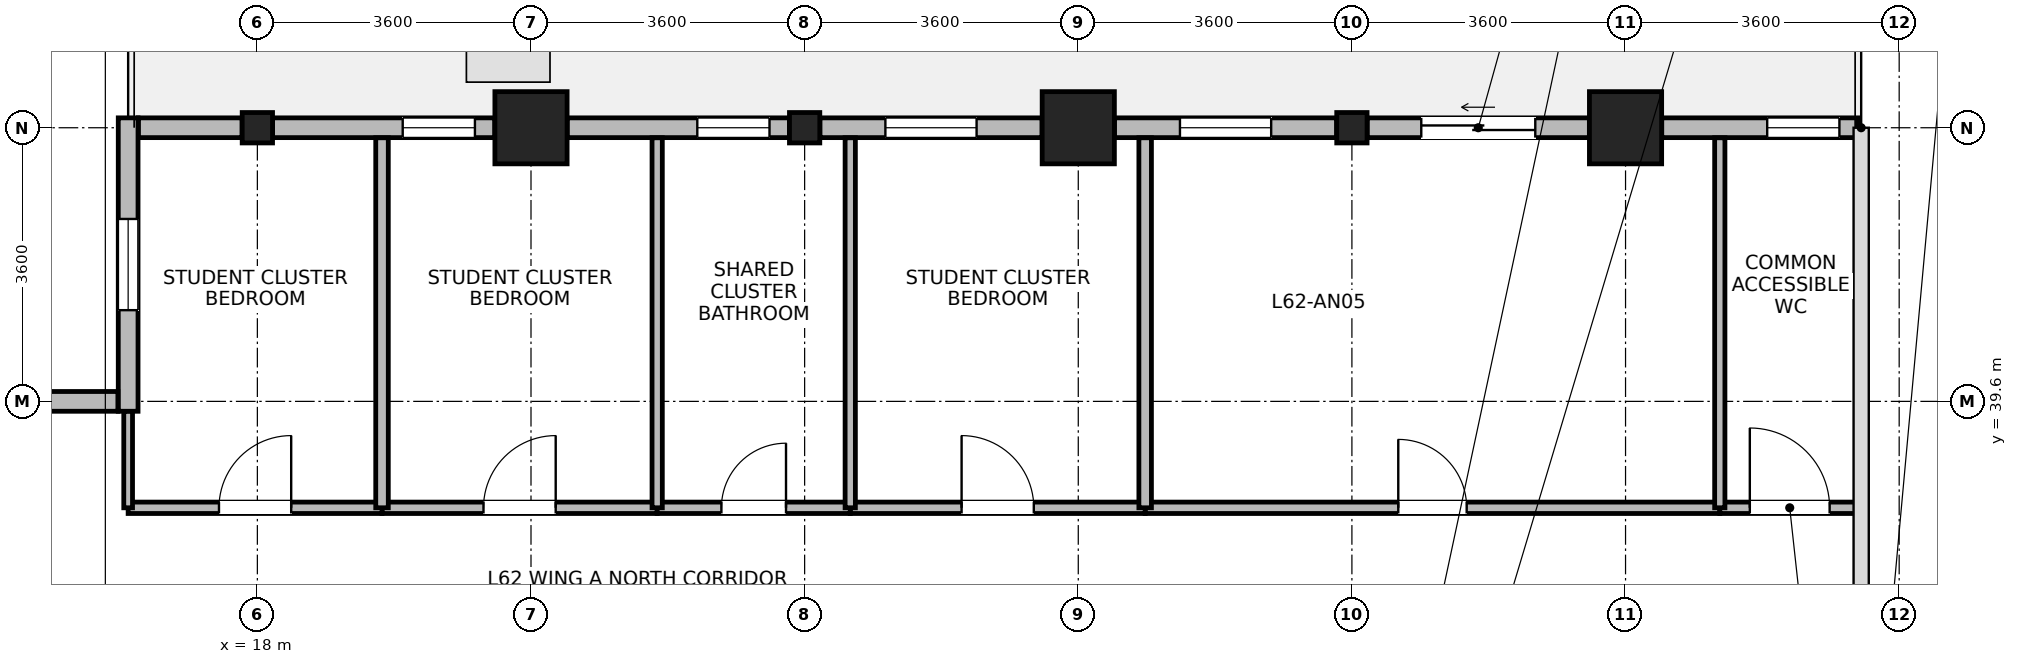
"""IFC4 building model, lengths in metres.
Left out: names, types, materials, properties, quantities, classifications, styles, units other than length and angle.
Written with IfcOpenShell. Run it as: python <this file> out.ifc"""

import sys

from ifc_helpers import new_model, si_unit, direction, frame, frame_2d, origin, origin_2d, place, context, subcontext, project, spatial, rectangle, i_section, extrude, source, transform, mapped, element, fill, save


model = new_model("IFC4")
c1 = context("Model", 3, precision=1e-05, world=origin(), true_north=direction((0.0, 1.0)))
c2 = subcontext(c1, "Body", "Model", "MODEL_VIEW")
j1 = project(units=[si_unit("LENGTHUNIT", "METRE"), si_unit("PLANEANGLEUNIT", "RADIAN")], contexts=[c1])
p1 = place(None, origin())
s1 = spatial("IfcSite", under=j1, at=p1, CompositionType="ELEMENT")
p2 = place(p1, origin())
s2 = spatial("IfcBuilding", under=s1, at=p2, CompositionType="ELEMENT")
p3 = place(p2, frame((0.0, 0.0, 242.5)))
s3 = spatial("IfcBuildingStorey", under=s2, at=p3, CompositionType="ELEMENT", Elevation=242.5)
m1 = source(origin(), c2, "Body", "SweptSolid", [
    extrude(rectangle(XDim=0.95, YDim=0.95, at=origin_2d()), origin(), (0.0, 0.0, 1.0), 3.7),
])
for number, where, z_axis, x_axis in (
    (1, (21.6, 43.2, 0.0), (0.0, 0.0, 1.0), (1.0, 0.0, 0.0)),
    (2, (28.8, 43.2, 0.0), (0.0, 0.0, 1.0), (1.0, 0.0, 0.0)),
    (3, (36.0, 43.2, 0.0), (0.0, 0.0, 1.0), (1.0, 0.0, 0.0)),
):
    element("IfcColumn", number, at=place(p3, frame(where, z_axis=z_axis, x_axis=x_axis)), inside=s3, PredefinedType="COLUMN", context=c2, shape_type="MappedRepresentation", body=[
        mapped(m1, transform((0.0, 0.0, 0.0), x_axis=(1.0, 0.0, 0.0), y_axis=(0.0, 1.0, 0.0), z_axis=(0.0, 0.0, 1.0), scale=1.0)),
    ])
m2 = source(origin(), c2, "Body", "SweptSolid", [
    extrude(i_section(OverallWidth=0.399, OverallDepth=0.4, WebThickness=0.017, FlangeThickness=0.023, FilletRadius=0.015, at=origin_2d()), origin(), (0.0, 0.0, 1.0), 3.7),
])
for number, where, z_axis, x_axis in (
    (4, (18.0, 43.2, 0.0), (0.0, 0.0, 1.0), (1.0, 0.0, 0.0)),
    (5, (25.2, 43.2, 0.0), (0.0, 0.0, 1.0), (1.0, 0.0, 0.0)),
    (6, (32.4, 43.2, 0.0), (0.0, 0.0, 1.0), (1.0, 0.0, 0.0)),
):
    element("IfcColumn", number, at=place(p3, frame(where, z_axis=z_axis, x_axis=x_axis)), inside=s3, PredefinedType="COLUMN", context=c2, shape_type="MappedRepresentation", body=[
        mapped(m2, transform((0.0, 0.0, 0.0), x_axis=(1.0, 0.0, 0.0), y_axis=(0.0, 1.0, 0.0), z_axis=(0.0, 0.0, 1.0), scale=1.0)),
    ])
p4 = place(p3, frame((36.476, 43.2, 0.0), z_axis=(0.0, 0.0, 1.0), x_axis=(1.0, 0.0, 0.0)))
e7 = element("IfcWall", 7, at=p4, inside=s3, PredefinedType="STANDARD", context=c2, shape_type="SweptSolid", body=[
    extrude(rectangle(XDim=2.587, YDim=0.26, at=frame_2d((1.293, 0.0))), origin(), (0.0, 0.0, 1.0), 3.42),
])
p5 = place(p4, frame((1.388, 0.0, 0.85)))
e8 = element("IfcOpeningElement", 8, at=p5, cuts=e7, PredefinedType="OPENING", context=c2, shape_type="SweptSolid", body=[
    extrude(rectangle(XDim=0.95, YDim=1.75, at=frame_2d((0.475, 0.875))), frame((0.0, 0.14, 0.0), z_axis=(0.0, -1.0, 0.0), x_axis=(1.0, 0.0, 0.0)), (0.0, 0.0, 1.0), 0.28),
])
p6 = place(p3, frame((32.601, 43.2, 0.0), z_axis=(0.0, 0.0, 1.0), x_axis=(1.0, 0.0, 0.0)))
e9 = element("IfcWall", 9, at=p6, inside=s3, PredefinedType="STANDARD", context=c2, shape_type="SweptSolid", body=[
    extrude(rectangle(XDim=2.923, YDim=0.26, at=frame_2d((1.462, 0.0))), origin(), (0.0, 0.0, 1.0), 3.02),
])
p7 = place(p6, frame((0.712, 0.0, 0.0)))
e10 = element("IfcOpeningElement", 10, at=p7, cuts=e9, PredefinedType="OPENING", context=c2, shape_type="SweptSolid", body=[
    extrude(rectangle(XDim=1.5, YDim=2.15, at=frame_2d((0.75, 1.075))), frame((0.0, 0.14, 0.0), z_axis=(0.0, -1.0, 0.0), x_axis=(1.0, 0.0, 0.0)), (0.0, 0.0, 1.0), 0.28),
])
p8 = place(p3, frame((29.276, 43.2, 0.0), z_axis=(0.0, 0.0, 1.0), x_axis=(1.0, 0.0, 0.0)))
e11 = element("IfcWall", 11, at=p8, inside=s3, PredefinedType="STANDARD", context=c2, shape_type="SweptSolid", body=[
    extrude(rectangle(XDim=2.924, YDim=0.26, at=frame_2d((1.462, 0.0))), origin(), (0.0, 0.0, 1.0), 3.02),
])
p9 = place(p8, frame((0.862, 0.0, 0.85)))
e12 = element("IfcOpeningElement", 12, at=p9, cuts=e11, PredefinedType="OPENING", context=c2, shape_type="SweptSolid", body=[
    extrude(rectangle(XDim=1.2, YDim=1.75, at=frame_2d((0.6, 0.875))), frame((0.0, 0.14, 0.0), z_axis=(0.0, -1.0, 0.0), x_axis=(1.0, 0.0, 0.0)), (0.0, 0.0, 1.0), 0.28),
])
p10 = place(p3, frame((25.4, 43.2, 0.0), z_axis=(0.0, 0.0, 1.0), x_axis=(1.0, 0.0, 0.0)))
e13 = element("IfcWall", 13, at=p10, inside=s3, PredefinedType="STANDARD", context=c2, shape_type="SweptSolid", body=[
    extrude(rectangle(XDim=2.924, YDim=0.26, at=frame_2d((1.462, 0.0))), origin(), (0.0, 0.0, 1.0), 3.02),
])
p11 = place(p10, frame((0.862, 0.0, 0.85)))
e14 = element("IfcOpeningElement", 14, at=p11, cuts=e13, PredefinedType="OPENING", context=c2, shape_type="SweptSolid", body=[
    extrude(rectangle(XDim=1.2, YDim=1.75, at=frame_2d((0.6, 0.875))), frame((0.0, 0.14, 0.0), z_axis=(0.0, -1.0, 0.0), x_axis=(1.0, 0.0, 0.0)), (0.0, 0.0, 1.0), 0.28),
])
p12 = place(p3, frame((22.076, 43.2, 0.0), z_axis=(0.0, 0.0, 1.0), x_axis=(1.0, 0.0, 0.0)))
e15 = element("IfcWall", 15, at=p12, inside=s3, PredefinedType="STANDARD", context=c2, shape_type="SweptSolid", body=[
    extrude(rectangle(XDim=2.924, YDim=0.26, at=frame_2d((1.462, 0.0))), origin(), (0.0, 0.0, 1.0), 3.02),
])
p13 = place(p12, frame((1.712, 0.0, 0.85)))
e16 = element("IfcOpeningElement", 16, at=p13, cuts=e15, PredefinedType="OPENING", context=c2, shape_type="SweptSolid", body=[
    extrude(rectangle(XDim=0.95, YDim=1.75, at=frame_2d((0.475, 0.875))), frame((0.0, 0.14, 0.0), z_axis=(0.0, -1.0, 0.0), x_axis=(1.0, 0.0, 0.0)), (0.0, 0.0, 1.0), 0.28),
])
p14 = place(p3, frame((18.2, 43.2, 0.0), z_axis=(0.0, 0.0, 1.0), x_axis=(1.0, 0.0, 0.0)))
e17 = element("IfcWall", 17, at=p14, inside=s3, PredefinedType="STANDARD", context=c2, shape_type="SweptSolid", body=[
    extrude(rectangle(XDim=2.924, YDim=0.26, at=frame_2d((1.462, 0.0))), origin(), (0.0, 0.0, 1.0), 3.02),
])
p15 = place(p14, frame((1.712, 0.0, 0.85)))
e18 = element("IfcOpeningElement", 18, at=p15, cuts=e17, PredefinedType="OPENING", context=c2, shape_type="SweptSolid", body=[
    extrude(rectangle(XDim=0.95, YDim=1.75, at=frame_2d((0.475, 0.875))), frame((0.0, 0.14, 0.0), z_axis=(0.0, -1.0, 0.0), x_axis=(1.0, 0.0, 0.0)), (0.0, 0.0, 1.0), 0.28),
])
p16 = place(p3, frame((16.435, 43.2, 0.0), z_axis=(0.0, 0.0, 1.0), x_axis=(1.0, 0.0, 0.0)))
e19 = element("IfcWall", 19, at=p16, inside=s3, PredefinedType="STANDARD", context=c2, shape_type="SweptSolid", body=[
    extrude(rectangle(XDim=1.365, YDim=0.26, at=frame_2d((0.682, 0.0))), origin(), (0.0, 0.0, 1.0), 3.02),
])
p17 = place(p3, frame((16.3, 39.47, 0.0), z_axis=(0.0, 0.0, 1.0), x_axis=(0.0, 1.0, 0.0)))
e20 = element("IfcWall", 20, at=p17, inside=s3, PredefinedType="STANDARD", context=c2, shape_type="SweptSolid", body=[
    extrude(rectangle(XDim=3.86, YDim=0.26, at=frame_2d((1.93, 0.0))), origin(), (0.0, 0.0, 1.0), 3.42),
])
p18 = place(p17, frame((1.33, 0.0, 0.85)))
e21 = element("IfcOpeningElement", 21, at=p18, cuts=e20, PredefinedType="OPENING", context=c2, shape_type="SweptSolid", body=[
    extrude(rectangle(XDim=1.2, YDim=1.75, at=frame_2d((0.6, 0.875))), frame((0.0, 0.14, 0.0), z_axis=(0.0, -1.0, 0.0), x_axis=(1.0, 0.0, 0.0)), (0.0, 0.0, 1.0), 0.28),
])
p19 = place(p3, frame((6.835, 39.6, 0.0), z_axis=(0.0, 0.0, 1.0), x_axis=(1.0, 0.0, 0.0)))
e22 = element("IfcWall", 22, at=p19, inside=s3, PredefinedType="STANDARD", context=c2, shape_type="SweptSolid", body=[
    extrude(rectangle(XDim=9.33, YDim=0.26, at=frame_2d((4.665, 0.0))), origin(), (0.0, 0.0, 1.0), 3.42),
])
p20 = place(p19, frame((0.955, 0.0, 0.85)))
e23 = element("IfcOpeningElement", 23, at=p20, cuts=e22, PredefinedType="OPENING", context=c2, shape_type="SweptSolid", body=[
    extrude(rectangle(XDim=1.2, YDim=1.75, at=frame_2d((0.6, 0.875))), frame((0.0, 0.14, 0.0), z_axis=(0.0, -1.0, 0.0), x_axis=(1.0, 0.0, 0.0)), (0.0, 0.0, 1.0), 0.28),
])
p21 = place(p19, frame((4.065, 0.0, 0.85)))
e24 = element("IfcOpeningElement", 24, at=p21, cuts=e22, PredefinedType="OPENING", context=c2, shape_type="SweptSolid", body=[
    extrude(rectangle(XDim=1.2, YDim=1.75, at=frame_2d((0.6, 0.875))), frame((0.0, 0.14, 0.0), z_axis=(0.0, -1.0, 0.0), x_axis=(1.0, 0.0, 0.0)), (0.0, 0.0, 1.0), 0.28),
])
p22 = place(p19, frame((7.175, 0.0, 0.85)))
e25 = element("IfcOpeningElement", 25, at=p22, cuts=e22, PredefinedType="OPENING", context=c2, shape_type="SweptSolid", body=[
    extrude(rectangle(XDim=1.2, YDim=1.75, at=frame_2d((0.6, 0.875))), frame((0.0, 0.14, 0.0), z_axis=(0.0, -1.0, 0.0), x_axis=(1.0, 0.0, 0.0)), (0.0, 0.0, 1.0), 0.28),
])
p23 = place(p3, frame((29.68, 38.2, 0.0), z_axis=(0.0, 0.0, 1.0), x_axis=(1.0, 0.0, 0.0)))
e26 = element("IfcWall", 26, at=p23, inside=s3, PredefinedType="PARTITIONING", context=c2, shape_type="SweptSolid", body=[
    extrude(rectangle(XDim=7.56, YDim=0.15, at=frame_2d((3.78, 0.0))), origin(), (0.0, 0.0, 1.0), 3.42),
])
p24 = place(p23, frame((3.33, 0.0, 0.0)))
e27 = element("IfcOpeningElement", 27, at=p24, cuts=e26, PredefinedType="OPENING", context=c2, shape_type="SweptSolid", body=[
    extrude(rectangle(XDim=0.9, YDim=2.08, at=frame_2d((0.45, 1.04))), frame((0.0, 0.085, 0.0), z_axis=(0.0, -1.0, 0.0), x_axis=(1.0, 0.0, 0.0)), (0.0, 0.0, 1.0), 0.17),
])
p25 = place(p3, frame((25.8, 38.2, 0.0), z_axis=(0.0, 0.0, 1.0), x_axis=(1.0, 0.0, 0.0)))
e28 = element("IfcWall", 28, at=p25, inside=s3, PredefinedType="PARTITIONING", context=c2, shape_type="SweptSolid", body=[
    extrude(rectangle(XDim=3.88, YDim=0.15, at=frame_2d((1.94, 0.0))), origin(), (0.0, 0.0, 1.0), 3.42),
])
p26 = place(p25, frame((1.465, 0.0, 0.0)))
e29 = element("IfcOpeningElement", 29, at=p26, cuts=e28, PredefinedType="OPENING", context=c2, shape_type="SweptSolid", body=[
    extrude(rectangle(XDim=0.95, YDim=2.1, at=frame_2d((0.475, 1.05))), frame((0.0, 0.085, 0.0), z_axis=(0.0, -1.0, 0.0), x_axis=(1.0, 0.0, 0.0)), (0.0, 0.0, 1.0), 0.17),
])
p27 = place(p3, frame((19.64, 38.2, 0.0), z_axis=(0.0, 0.0, 1.0), x_axis=(1.0, 0.0, 0.0)))
e30 = element("IfcWall", 30, at=p27, inside=s3, PredefinedType="PARTITIONING", context=c2, shape_type="SweptSolid", body=[
    extrude(rectangle(XDim=3.62, YDim=0.15, at=frame_2d((1.81, 0.0))), origin(), (0.0, 0.0, 1.0), 3.42),
])
p28 = place(p27, frame((1.335, 0.0, 0.0)))
e31 = element("IfcOpeningElement", 31, at=p28, cuts=e30, PredefinedType="OPENING", context=c2, shape_type="SweptSolid", body=[
    extrude(rectangle(XDim=0.95, YDim=2.1, at=frame_2d((0.475, 1.05))), frame((0.0, 0.085, 0.0), z_axis=(0.0, -1.0, 0.0), x_axis=(1.0, 0.0, 0.0)), (0.0, 0.0, 1.0), 0.17),
])
p29 = place(p3, frame((16.3, 38.2, 0.0), z_axis=(0.0, 0.0, 1.0), x_axis=(1.0, 0.0, 0.0)))
e32 = element("IfcWall", 32, at=p29, inside=s3, PredefinedType="PARTITIONING", context=c2, shape_type="SweptSolid", body=[
    extrude(rectangle(XDim=3.34, YDim=0.15, at=frame_2d((1.67, 0.0))), origin(), (0.0, 0.0, 1.0), 3.42),
])
p30 = place(p29, frame((1.195, 0.0, 0.0)))
e33 = element("IfcOpeningElement", 33, at=p30, cuts=e32, PredefinedType="OPENING", context=c2, shape_type="SweptSolid", body=[
    extrude(rectangle(XDim=0.95, YDim=2.1, at=frame_2d((0.475, 1.05))), frame((0.0, 0.085, 0.0), z_axis=(0.0, -1.0, 0.0), x_axis=(1.0, 0.0, 0.0)), (0.0, 0.0, 1.0), 0.17),
])
p31 = place(p3, frame((23.26, 38.2, 0.0), z_axis=(0.0, 0.0, 1.0), x_axis=(1.0, 0.0, 0.0)))
e34 = element("IfcWall", 34, at=p31, inside=s3, PredefinedType="PARTITIONING", context=c2, shape_type="SweptSolid", body=[
    extrude(rectangle(XDim=2.54, YDim=0.15, at=frame_2d((1.27, 0.0))), origin(), (0.0, 0.0, 1.0), 3.42),
])
p32 = place(p31, frame((0.845, 0.0, 0.0)))
e35 = element("IfcOpeningElement", 35, at=p32, cuts=e34, PredefinedType="OPENING", context=c2, shape_type="SweptSolid", body=[
    extrude(rectangle(XDim=0.85, YDim=2.04, at=frame_2d((0.425, 1.02))), frame((0.0, 0.085, 0.0), z_axis=(0.0, -1.0, 0.0), x_axis=(1.0, 0.0, 0.0)), (0.0, 0.0, 1.0), 0.17),
])
p33 = place(p3, frame((37.24, 38.2, 0.0), z_axis=(0.0, 0.0, 1.0), x_axis=(1.0, 0.0, 0.0)))
e36 = element("IfcWall", 36, at=p33, inside=s3, PredefinedType="PARTITIONING", context=c2, shape_type="SweptSolid", body=[
    extrude(rectangle(XDim=1.84, YDim=0.15, at=frame_2d((0.92, 0.0))), origin(), (0.0, 0.0, 1.0), 3.42),
])
p34 = place(p33, frame((0.395, 0.0, 0.0)))
e37 = element("IfcOpeningElement", 37, at=p34, cuts=e36, PredefinedType="OPENING", context=c2, shape_type="SweptSolid", body=[
    extrude(rectangle(XDim=1.05, YDim=2.12, at=frame_2d((0.525, 1.06))), frame((0.0, 0.085, 0.0), z_axis=(0.0, -1.0, 0.0), x_axis=(1.0, 0.0, 0.0)), (0.0, 0.0, 1.0), 0.17),
])
p35 = place(p3, frame((16.3, 38.2, 0.0), z_axis=(0.0, 0.0, 1.0), x_axis=(0.0, 1.0, 0.0)))
e38 = element("IfcWall", 38, at=p35, inside=s3, PredefinedType="PARTITIONING", context=c2, shape_type="SweptSolid", body=[
    extrude(rectangle(XDim=1.268, YDim=0.115, at=frame_2d((0.634, 0.0))), origin(), (0.0, 0.0, 1.0), 3.42),
])
p36 = place(p3, frame((19.64, 38.2, 0.0), z_axis=(0.0, 0.0, 1.0), x_axis=(0.0, 1.0, 0.0)))
e39 = element("IfcWall", 39, at=p36, inside=s3, PredefinedType="PARTITIONING", context=c2, shape_type="SweptSolid", body=[
    extrude(rectangle(XDim=4.868, YDim=0.165, at=frame_2d((2.434, 0.0))), origin(), (0.0, 0.0, 1.0), 3.42),
])
for number, where, z_axis, x_axis in (
    (40, (23.26, 38.2, 0.0), (0.0, 0.0, 1.0), (0.0, 1.0, 0.0)),
    (41, (25.8, 38.2, 0.0), (0.0, 0.0, 1.0), (0.0, 1.0, 0.0)),
):
    element("IfcWall", number, at=place(p3, frame(where, z_axis=z_axis, x_axis=x_axis)), inside=s3, PredefinedType="PARTITIONING", context=c2, shape_type="SweptSolid", body=[
        extrude(rectangle(XDim=4.868, YDim=0.135, at=frame_2d((2.434, 0.0))), origin(), (0.0, 0.0, 1.0), 3.42),
    ])
p37 = place(p3, frame((29.68, 38.2, 0.0), z_axis=(0.0, 0.0, 1.0), x_axis=(0.0, 1.0, 0.0)))
e42 = element("IfcWall", 42, at=p37, inside=s3, PredefinedType="PARTITIONING", context=c2, shape_type="SweptSolid", body=[
    extrude(rectangle(XDim=4.868, YDim=0.165, at=frame_2d((2.434, 0.0))), origin(), (0.0, 0.0, 1.0), 3.42),
])
p38 = place(p3, frame((37.24, 38.2, 0.0), z_axis=(0.0, 0.0, 1.0), x_axis=(0.0, 1.0, 0.0)))
e43 = element("IfcWall", 43, at=p38, inside=s3, PredefinedType="PARTITIONING", context=c2, shape_type="SweptSolid", body=[
    extrude(rectangle(XDim=4.868, YDim=0.135, at=frame_2d((2.434, 0.0))), origin(), (0.0, 0.0, 1.0), 3.42),
])
p39 = place(p5, origin())
e44 = element("IfcWindow", 44, at=p39, inside=s3, PartitioningType="SINGLE_PANEL", PredefinedType="WINDOW", context=c2, shape_type="SweptSolid", body=[
    extrude(rectangle(XDim=0.95, YDim=1.75, at=frame_2d((0.475, 0.875))), frame((0.0, 0.03, 0.0), z_axis=(0.0, -1.0, 0.0), x_axis=(1.0, 0.0, 0.0)), (0.0, 0.0, 1.0), 0.06),
])
fill(e8, e44)
p40 = place(p7, origin())
e45 = element("IfcDoor", 45, at=p40, inside=s3, OperationType="SLIDING_TO_LEFT", PredefinedType="DOOR", context=c2, shape_type="SweptSolid", body=[
    extrude(rectangle(XDim=1.5, YDim=2.15, at=frame_2d((0.75, 1.075))), frame((0.0, 0.025, 0.0), z_axis=(0.0, -1.0, 0.0), x_axis=(1.0, 0.0, 0.0)), (0.0, 0.0, 1.0), 0.05),
])
fill(e10, e45)
p41 = place(p9, origin())
e46 = element("IfcWindow", 46, at=p41, inside=s3, PartitioningType="SINGLE_PANEL", PredefinedType="WINDOW", context=c2, shape_type="SweptSolid", body=[
    extrude(rectangle(XDim=1.2, YDim=1.75, at=frame_2d((0.6, 0.875))), frame((0.0, 0.03, 0.0), z_axis=(0.0, -1.0, 0.0), x_axis=(1.0, 0.0, 0.0)), (0.0, 0.0, 1.0), 0.06),
])
fill(e12, e46)
p42 = place(p11, origin())
e47 = element("IfcWindow", 47, at=p42, inside=s3, PartitioningType="SINGLE_PANEL", PredefinedType="WINDOW", context=c2, shape_type="SweptSolid", body=[
    extrude(rectangle(XDim=1.2, YDim=1.75, at=frame_2d((0.6, 0.875))), frame((0.0, 0.03, 0.0), z_axis=(0.0, -1.0, 0.0), x_axis=(1.0, 0.0, 0.0)), (0.0, 0.0, 1.0), 0.06),
])
fill(e14, e47)
p43 = place(p13, origin())
e48 = element("IfcWindow", 48, at=p43, inside=s3, PartitioningType="SINGLE_PANEL", PredefinedType="WINDOW", context=c2, shape_type="SweptSolid", body=[
    extrude(rectangle(XDim=0.95, YDim=1.75, at=frame_2d((0.475, 0.875))), frame((0.0, 0.03, 0.0), z_axis=(0.0, -1.0, 0.0), x_axis=(1.0, 0.0, 0.0)), (0.0, 0.0, 1.0), 0.06),
])
fill(e16, e48)
p44 = place(p15, origin())
e49 = element("IfcWindow", 49, at=p44, inside=s3, PartitioningType="SINGLE_PANEL", PredefinedType="WINDOW", context=c2, shape_type="SweptSolid", body=[
    extrude(rectangle(XDim=0.95, YDim=1.75, at=frame_2d((0.475, 0.875))), frame((0.0, 0.03, 0.0), z_axis=(0.0, -1.0, 0.0), x_axis=(1.0, 0.0, 0.0)), (0.0, 0.0, 1.0), 0.06),
])
fill(e18, e49)
p45 = place(p18, origin())
e50 = element("IfcWindow", 50, at=p45, inside=s3, PartitioningType="SINGLE_PANEL", PredefinedType="WINDOW", context=c2, shape_type="SweptSolid", body=[
    extrude(rectangle(XDim=1.2, YDim=1.75, at=frame_2d((0.6, 0.875))), frame((0.0, 0.03, 0.0), z_axis=(0.0, -1.0, 0.0), x_axis=(1.0, 0.0, 0.0)), (0.0, 0.0, 1.0), 0.06),
])
fill(e21, e50)
p46 = place(p24, origin())
e51 = element("IfcDoor", 51, at=p46, inside=s3, OperationType="SINGLE_SWING_LEFT", PredefinedType="DOOR", context=c2, shape_type="SweptSolid", body=[
    extrude(rectangle(XDim=0.9, YDim=2.08, at=frame_2d((0.45, 1.04))), frame((0.0, 0.025, 0.0), z_axis=(0.0, -1.0, 0.0), x_axis=(1.0, 0.0, 0.0)), (0.0, 0.0, 1.0), 0.05),
])
fill(e27, e51)
p47 = place(p26, origin())
e52 = element("IfcDoor", 52, at=p47, inside=s3, OperationType="SINGLE_SWING_LEFT", PredefinedType="DOOR", context=c2, shape_type="SweptSolid", body=[
    extrude(rectangle(XDim=0.95, YDim=2.1, at=frame_2d((0.475, 1.05))), frame((0.0, 0.025, 0.0), z_axis=(0.0, -1.0, 0.0), x_axis=(1.0, 0.0, 0.0)), (0.0, 0.0, 1.0), 0.05),
])
fill(e29, e52)
p48 = place(p28, origin())
e53 = element("IfcDoor", 53, at=p48, inside=s3, OperationType="SINGLE_SWING_RIGHT", PredefinedType="DOOR", context=c2, shape_type="SweptSolid", body=[
    extrude(rectangle(XDim=0.95, YDim=2.1, at=frame_2d((0.475, 1.05))), frame((0.0, 0.025, 0.0), z_axis=(0.0, -1.0, 0.0), x_axis=(1.0, 0.0, 0.0)), (0.0, 0.0, 1.0), 0.05),
])
fill(e31, e53)
p49 = place(p30, origin())
e54 = element("IfcDoor", 54, at=p49, inside=s3, OperationType="SINGLE_SWING_RIGHT", PredefinedType="DOOR", context=c2, shape_type="SweptSolid", body=[
    extrude(rectangle(XDim=0.95, YDim=2.1, at=frame_2d((0.475, 1.05))), frame((0.0, 0.025, 0.0), z_axis=(0.0, -1.0, 0.0), x_axis=(1.0, 0.0, 0.0)), (0.0, 0.0, 1.0), 0.05),
])
fill(e33, e54)
p50 = place(p32, origin())
e55 = element("IfcDoor", 55, at=p50, inside=s3, OperationType="SINGLE_SWING_RIGHT", PredefinedType="DOOR", context=c2, shape_type="SweptSolid", body=[
    extrude(rectangle(XDim=0.85, YDim=2.04, at=frame_2d((0.425, 1.02))), frame((0.0, 0.025, 0.0), z_axis=(0.0, -1.0, 0.0), x_axis=(1.0, 0.0, 0.0)), (0.0, 0.0, 1.0), 0.05),
])
fill(e35, e55)
p51 = place(p34, origin())
e56 = element("IfcDoor", 56, at=p51, inside=s3, OperationType="SINGLE_SWING_LEFT", PredefinedType="DOOR", context=c2, shape_type="SweptSolid", body=[
    extrude(rectangle(XDim=1.05, YDim=2.12, at=frame_2d((0.525, 1.06))), frame((0.0, 0.025, 0.0), z_axis=(0.0, -1.0, 0.0), x_axis=(1.0, 0.0, 0.0)), (0.0, 0.0, 1.0), 0.05),
])
fill(e37, e56)
save(model, sys.argv[1])
